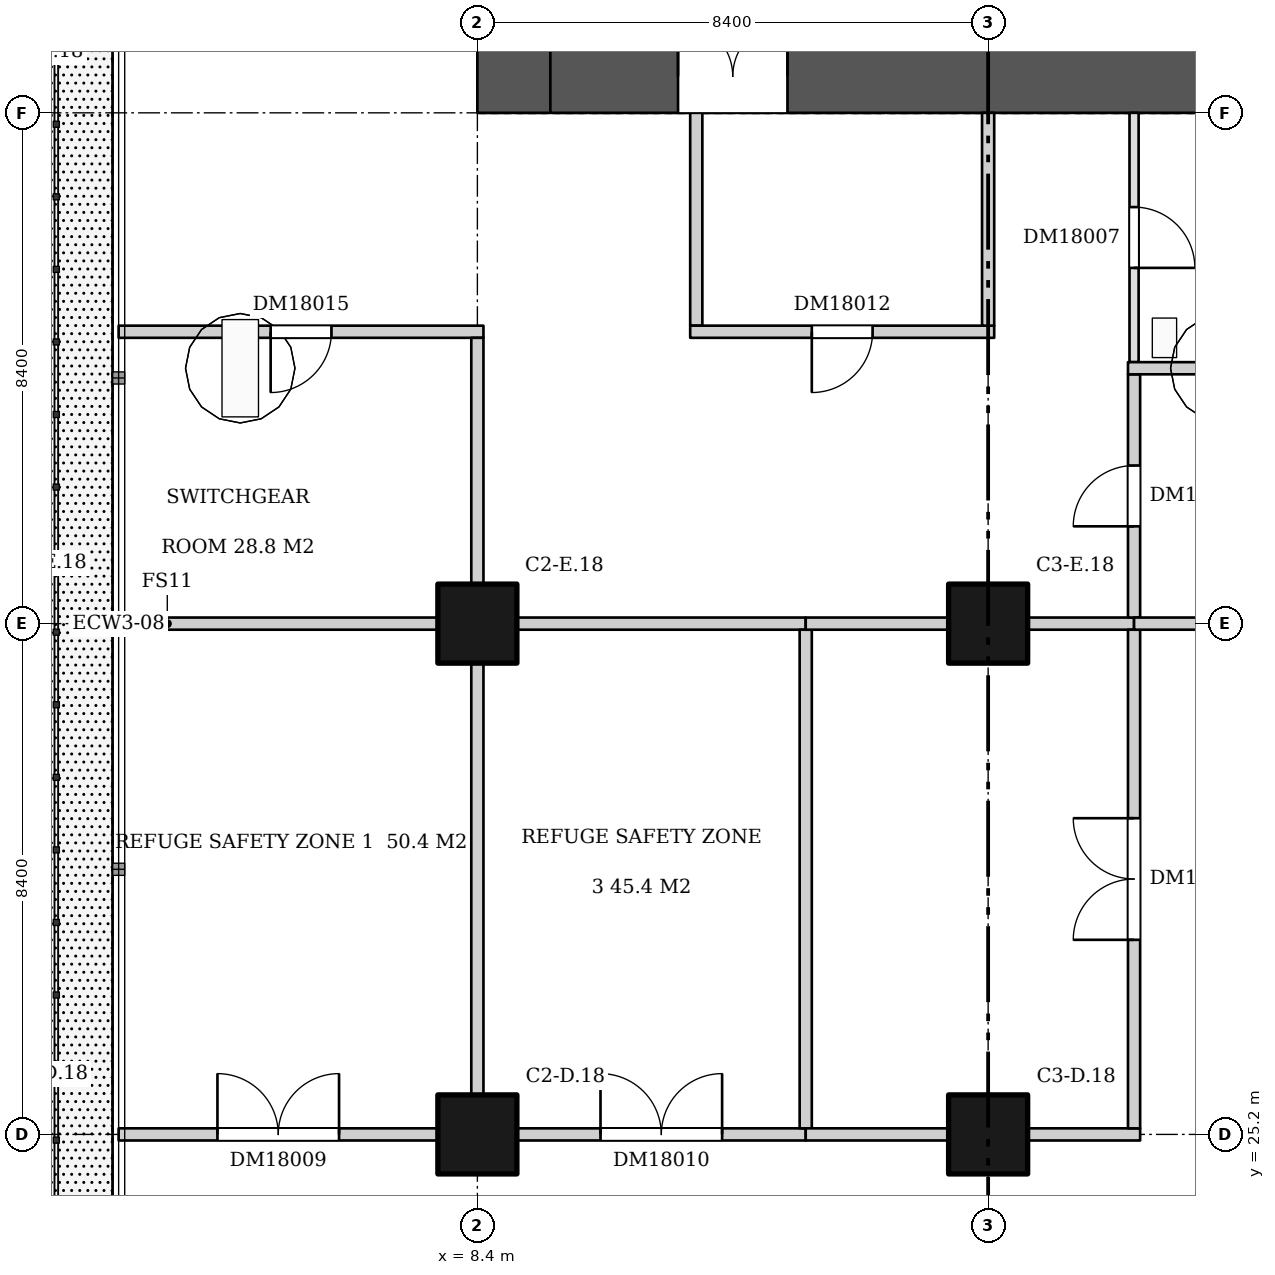
"""IFC4 building model, lengths in metres.
Left out: names, types, materials, properties, quantities, classifications, styles, units other than length and angle.
Written with IfcOpenShell. Run it as: python <this file> out.ifc"""

import sys

from ifc_helpers import new_model, si_unit, direction, frame, frame_2d, origin, origin_2d, place, context, subcontext, project, spatial, rectangle, extrude, element, fill, save


model = new_model("IFC4")
c1 = context("Model", 3, precision=1e-05, world=origin(), true_north=direction((0.0, 1.0)))
c2 = subcontext(c1, "Body", "Model", "MODEL_VIEW")
j1 = project(units=[si_unit("LENGTHUNIT", "METRE"), si_unit("PLANEANGLEUNIT", "RADIAN")], contexts=[c1])
p1 = place(None, origin())
s1 = spatial("IfcSite", under=j1, at=p1, CompositionType="ELEMENT")
p2 = place(p1, origin())
s2 = spatial("IfcBuilding", under=s1, at=p2, CompositionType="ELEMENT")
p3 = place(p2, frame((0.0, 0.0, 74.2)))
s3 = spatial("IfcBuildingStorey", under=s2, at=p3, CompositionType="ELEMENT", Elevation=74.2)
for number, where, z_axis, x_axis in (
    (1, (8.4, 25.2, 0.0), (0.0, 0.0, 1.0), (1.0, 0.0, 0.0)),
    (2, (8.4, 33.6, 0.0), (0.0, 0.0, 1.0), (1.0, 0.0, 0.0)),
    (3, (16.8, 25.2, 0.0), (0.0, 0.0, 1.0), (1.0, 0.0, 0.0)),
    (4, (16.8, 33.6, 0.0), (0.0, 0.0, 1.0), (1.0, 0.0, 0.0)),
):
    element("IfcColumn", number, at=place(p3, frame(where, z_axis=z_axis, x_axis=x_axis)), inside=s3, PredefinedType="COLUMN", context=c2, shape_type="SweptSolid", body=[
        extrude(rectangle(XDim=1.3, YDim=1.3, at=origin_2d()), origin(), (0.0, 0.0, 1.0), 6.72),
    ])
p4 = place(p3, frame((9.0, 58.8, 0.0), z_axis=(0.0, 0.0, 1.0), x_axis=(0.0, -1.0, 0.0)))
e5 = element("IfcWall", 5, at=p4, inside=s3, PredefinedType="SHEAR", context=c2, shape_type="SweptSolid", body=[
    extrude(rectangle(XDim=16.8, YDim=1.2, at=frame_2d((8.4, 0.0))), origin(), (0.0, 0.0, 1.0), 6.72),
])
p5 = place(p4, frame((3.1, 0.0, 0.0)))
e6 = element("IfcOpeningElement", 6, at=p5, cuts=e5, PredefinedType="OPENING", context=c2, shape_type="SweptSolid", body=[
    extrude(rectangle(XDim=1.0, YDim=2.1, at=frame_2d((0.5, 1.05))), frame((0.0, 0.61, 0.0), z_axis=(0.0, -1.0, 0.0), x_axis=(1.0, 0.0, 0.0)), (0.0, 0.0, 1.0), 1.22),
])
p6 = place(p4, frame((12.7, 0.0, 0.0)))
e7 = element("IfcOpeningElement", 7, at=p6, cuts=e5, PredefinedType="OPENING", context=c2, shape_type="SweptSolid", body=[
    extrude(rectangle(XDim=1.0, YDim=2.1, at=frame_2d((0.5, 1.05))), frame((0.0, 0.61, 0.0), z_axis=(0.0, -1.0, 0.0), x_axis=(1.0, 0.0, 0.0)), (0.0, 0.0, 1.0), 1.22),
])
p7 = place(p3, frame((9.6, 42.6, 0.0), z_axis=(0.0, 0.0, 1.0), x_axis=(1.0, 0.0, 0.0)))
e8 = element("IfcWall", 8, at=p7, inside=s3, PredefinedType="SHEAR", context=c2, shape_type="SweptSolid", body=[
    extrude(rectangle(XDim=14.4, YDim=1.2, at=frame_2d((7.2, 0.0))), origin(), (0.0, 0.0, 1.0), 6.72),
])
p8 = place(p7, frame((2.1, 0.0, 0.0)))
e9 = element("IfcOpeningElement", 9, at=p8, cuts=e8, PredefinedType="OPENING", context=c2, shape_type="SweptSolid", body=[
    extrude(rectangle(XDim=1.8, YDim=2.1, at=frame_2d((0.9, 1.05))), frame((0.0, 0.61, 0.0), z_axis=(0.0, -1.0, 0.0), x_axis=(1.0, 0.0, 0.0)), (0.0, 0.0, 1.0), 1.22),
])
p9 = place(p3, frame((2.5, 25.2, 0.0), z_axis=(0.0, 0.0, 1.0), x_axis=(1.0, 0.0, 0.0)))
e10 = element("IfcWall", 10, at=p9, inside=s3, PredefinedType="PARTITIONING", context=c2, shape_type="SweptSolid", body=[
    extrude(rectangle(XDim=5.25, YDim=0.2, at=frame_2d((2.625, 0.0))), origin(), (0.0, 0.0, 1.0), 6.72),
])
p10 = place(p9, frame((1.625, 0.0, 0.0)))
e11 = element("IfcOpeningElement", 11, at=p10, cuts=e10, PredefinedType="OPENING", context=c2, shape_type="SweptSolid", body=[
    extrude(rectangle(XDim=2.0, YDim=2.1, at=frame_2d((1.0, 1.05))), frame((0.0, 0.11, 0.0), z_axis=(0.0, -1.0, 0.0), x_axis=(1.0, 0.0, 0.0)), (0.0, 0.0, 1.0), 0.22),
])
p11 = place(p3, frame((2.5, 33.6, 0.0), z_axis=(0.0, 0.0, 1.0), x_axis=(1.0, 0.0, 0.0)))
e12 = element("IfcWall", 12, at=p11, inside=s3, PredefinedType="PARTITIONING", context=c2, shape_type="SweptSolid", body=[
    extrude(rectangle(XDim=5.25, YDim=0.2, at=frame_2d((2.625, 0.0))), origin(), (0.0, 0.0, 1.0), 6.72),
])
p12 = place(p3, frame((2.5, 38.4, 0.0), z_axis=(0.0, 0.0, 1.0), x_axis=(1.0, 0.0, 0.0)))
e13 = element("IfcWall", 13, at=p12, inside=s3, PredefinedType="PARTITIONING", context=c2, shape_type="SweptSolid", body=[
    extrude(rectangle(XDim=6.0, YDim=0.2, at=frame_2d((3.0, 0.0))), origin(), (0.0, 0.0, 1.0), 6.72),
])
p13 = place(p12, frame((2.5, 0.0, 0.0)))
e14 = element("IfcOpeningElement", 14, at=p13, cuts=e13, PredefinedType="OPENING", context=c2, shape_type="SweptSolid", body=[
    extrude(rectangle(XDim=1.0, YDim=2.1, at=frame_2d((0.5, 1.05))), frame((0.0, 0.11, 0.0), z_axis=(0.0, -1.0, 0.0), x_axis=(1.0, 0.0, 0.0)), (0.0, 0.0, 1.0), 0.22),
])
p14 = place(p3, frame((8.4, 25.85, 0.0), z_axis=(0.0, 0.0, 1.0), x_axis=(0.0, 1.0, 0.0)))
e15 = element("IfcWall", 15, at=p14, inside=s3, PredefinedType="PARTITIONING", context=c2, shape_type="SweptSolid", body=[
    extrude(rectangle(XDim=7.1, YDim=0.2, at=frame_2d((3.55, 0.0))), origin(), (0.0, 0.0, 1.0), 6.72),
])
p15 = place(p3, frame((9.05, 25.2, 0.0), z_axis=(0.0, 0.0, 1.0), x_axis=(1.0, 0.0, 0.0)))
e16 = element("IfcWall", 16, at=p15, inside=s3, PredefinedType="PARTITIONING", context=c2, shape_type="SweptSolid", body=[
    extrude(rectangle(XDim=4.75, YDim=0.2, at=frame_2d((2.375, 0.0))), origin(), (0.0, 0.0, 1.0), 6.72),
])
p16 = place(p15, frame((1.375, 0.0, 0.0)))
e17 = element("IfcOpeningElement", 17, at=p16, cuts=e16, PredefinedType="OPENING", context=c2, shape_type="SweptSolid", body=[
    extrude(rectangle(XDim=2.0, YDim=2.1, at=frame_2d((1.0, 1.05))), frame((0.0, 0.11, 0.0), z_axis=(0.0, -1.0, 0.0), x_axis=(1.0, 0.0, 0.0)), (0.0, 0.0, 1.0), 0.22),
])
p17 = place(p3, frame((8.4, 34.25, 0.0), z_axis=(0.0, 0.0, 1.0), x_axis=(0.0, 1.0, 0.0)))
e18 = element("IfcWall", 18, at=p17, inside=s3, PredefinedType="PARTITIONING", context=c2, shape_type="SweptSolid", body=[
    extrude(rectangle(XDim=4.05, YDim=0.2, at=frame_2d((2.025, 0.0))), origin(), (0.0, 0.0, 1.0), 6.72),
])
p18 = place(p3, frame((9.05, 33.6, 0.0), z_axis=(0.0, 0.0, 1.0), x_axis=(1.0, 0.0, 0.0)))
e19 = element("IfcWall", 19, at=p18, inside=s3, PredefinedType="PARTITIONING", context=c2, shape_type="SweptSolid", body=[
    extrude(rectangle(XDim=4.75, YDim=0.2, at=frame_2d((2.375, 0.0))), origin(), (0.0, 0.0, 1.0), 6.72),
])
p19 = place(p3, frame((12.0, 38.5, 0.0), z_axis=(0.0, 0.0, 1.0), x_axis=(0.0, 1.0, 0.0)))
e20 = element("IfcWall", 20, at=p19, inside=s3, PredefinedType="PARTITIONING", context=c2, shape_type="SweptSolid", body=[
    extrude(rectangle(XDim=3.5, YDim=0.2, at=frame_2d((1.75, 0.0))), origin(), (0.0, 0.0, 1.0), 6.72),
])
p20 = place(p3, frame((11.9, 38.4, 0.0), z_axis=(0.0, 0.0, 1.0), x_axis=(1.0, 0.0, 0.0)))
e21 = element("IfcWall", 21, at=p20, inside=s3, PredefinedType="PARTITIONING", context=c2, shape_type="SweptSolid", body=[
    extrude(rectangle(XDim=5.0, YDim=0.2, at=frame_2d((2.5, 0.0))), origin(), (0.0, 0.0, 1.0), 6.72),
])
p21 = place(p20, frame((2.0, 0.0, 0.0)))
e22 = element("IfcOpeningElement", 22, at=p21, cuts=e21, PredefinedType="OPENING", context=c2, shape_type="SweptSolid", body=[
    extrude(rectangle(XDim=1.0, YDim=2.1, at=frame_2d((0.5, 1.05))), frame((0.0, 0.11, 0.0), z_axis=(0.0, -1.0, 0.0), x_axis=(1.0, 0.0, 0.0)), (0.0, 0.0, 1.0), 0.22),
])
p22 = place(p3, frame((13.8, 25.3, 0.0), z_axis=(0.0, 0.0, 1.0), x_axis=(0.0, 1.0, 0.0)))
e23 = element("IfcWall", 23, at=p22, inside=s3, PredefinedType="PARTITIONING", context=c2, shape_type="SweptSolid", body=[
    extrude(rectangle(XDim=8.2, YDim=0.2, at=frame_2d((4.1, 0.0))), origin(), (0.0, 0.0, 1.0), 6.72),
])
p23 = place(p3, frame((13.8, 25.2, 0.0), z_axis=(0.0, 0.0, 1.0), x_axis=(1.0, 0.0, 0.0)))
e24 = element("IfcWall", 24, at=p23, inside=s3, PredefinedType="PARTITIONING", context=c2, shape_type="SweptSolid", body=[
    extrude(rectangle(XDim=2.35, YDim=0.2, at=frame_2d((1.175, 0.0))), origin(), (0.0, 0.0, 1.0), 6.72),
])
p24 = place(p3, frame((17.45, 25.2, 0.0), z_axis=(0.0, 0.0, 1.0), x_axis=(1.0, 0.0, 0.0)))
e25 = element("IfcWall", 25, at=p24, inside=s3, PredefinedType="PARTITIONING", context=c2, shape_type="SweptSolid", body=[
    extrude(rectangle(XDim=1.85, YDim=0.2, at=frame_2d((0.925, 0.0))), origin(), (0.0, 0.0, 1.0), 6.72),
])
p25 = place(p3, frame((13.8, 33.6, 0.0), z_axis=(0.0, 0.0, 1.0), x_axis=(1.0, 0.0, 0.0)))
e26 = element("IfcWall", 26, at=p25, inside=s3, PredefinedType="PARTITIONING", context=c2, shape_type="SweptSolid", body=[
    extrude(rectangle(XDim=2.35, YDim=0.2, at=frame_2d((1.175, 0.0))), origin(), (0.0, 0.0, 1.0), 6.72),
])
p26 = place(p3, frame((17.45, 33.6, 0.0), z_axis=(0.0, 0.0, 1.0), x_axis=(1.0, 0.0, 0.0)))
e27 = element("IfcWall", 27, at=p26, inside=s3, PredefinedType="PARTITIONING", context=c2, shape_type="SweptSolid", body=[
    extrude(rectangle(XDim=1.75, YDim=0.2, at=frame_2d((0.875, 0.0))), origin(), (0.0, 0.0, 1.0), 6.72),
])
p27 = place(p3, frame((16.8, 38.5, 0.0), z_axis=(0.0, 0.0, 1.0), x_axis=(0.0, 1.0, 0.0)))
e28 = element("IfcWall", 28, at=p27, inside=s3, PredefinedType="PARTITIONING", context=c2, shape_type="SweptSolid", body=[
    extrude(rectangle(XDim=3.5, YDim=0.2, at=frame_2d((1.75, 0.0))), origin(), (0.0, 0.0, 1.0), 6.72),
])
p28 = place(p3, frame((19.2, 25.3, 0.0), z_axis=(0.0, 0.0, 1.0), x_axis=(0.0, 1.0, 0.0)))
e29 = element("IfcWall", 29, at=p28, inside=s3, PredefinedType="PARTITIONING", context=c2, shape_type="SweptSolid", body=[
    extrude(rectangle(XDim=8.2, YDim=0.2, at=frame_2d((4.1, 0.0))), origin(), (0.0, 0.0, 1.0), 6.72),
])
p29 = place(p28, frame((3.1, 0.0, 0.0)))
e30 = element("IfcOpeningElement", 30, at=p29, cuts=e29, PredefinedType="OPENING", context=c2, shape_type="SweptSolid", body=[
    extrude(rectangle(XDim=2.0, YDim=2.1, at=frame_2d((1.0, 1.05))), frame((0.0, 0.11, 0.0), z_axis=(0.0, -1.0, 0.0), x_axis=(1.0, 0.0, 0.0)), (0.0, 0.0, 1.0), 0.22),
])
p30 = place(p3, frame((19.2, 33.7, 0.0), z_axis=(0.0, 0.0, 1.0), x_axis=(0.0, 1.0, 0.0)))
e31 = element("IfcWall", 31, at=p30, inside=s3, PredefinedType="PARTITIONING", context=c2, shape_type="SweptSolid", body=[
    extrude(rectangle(XDim=4.0, YDim=0.2, at=frame_2d((2.0, 0.0))), origin(), (0.0, 0.0, 1.0), 6.72),
])
p31 = place(p30, frame((1.5, 0.0, 0.0)))
e32 = element("IfcOpeningElement", 32, at=p31, cuts=e31, PredefinedType="OPENING", context=c2, shape_type="SweptSolid", body=[
    extrude(rectangle(XDim=1.0, YDim=2.1, at=frame_2d((0.5, 1.05))), frame((0.0, 0.11, 0.0), z_axis=(0.0, -1.0, 0.0), x_axis=(1.0, 0.0, 0.0)), (0.0, 0.0, 1.0), 0.22),
])
p32 = place(p3, frame((19.2, 33.6, 0.0), z_axis=(0.0, 0.0, 1.0), x_axis=(1.0, 0.0, 0.0)))
e33 = element("IfcWall", 33, at=p32, inside=s3, PredefinedType="PARTITIONING", context=c2, shape_type="SweptSolid", body=[
    extrude(rectangle(XDim=3.5, YDim=0.2, at=frame_2d((1.75, 0.0))), origin(), (0.0, 0.0, 1.0), 6.72),
])
p33 = place(p3, frame((19.2, 37.9, 0.0), z_axis=(0.0, 0.0, 1.0), x_axis=(0.0, 1.0, 0.0)))
e34 = element("IfcWall", 34, at=p33, inside=s3, PredefinedType="PARTITIONING", context=c2, shape_type="SweptSolid", body=[
    extrude(rectangle(XDim=4.1, YDim=0.15, at=frame_2d((2.05, 0.0))), origin(), (0.0, 0.0, 1.0), 6.72),
])
p34 = place(p33, frame((1.55, 0.0, 0.0)))
e35 = element("IfcOpeningElement", 35, at=p34, cuts=e34, PredefinedType="OPENING", context=c2, shape_type="SweptSolid", body=[
    extrude(rectangle(XDim=1.0, YDim=2.1, at=frame_2d((0.5, 1.05))), frame((0.0, 0.085, 0.0), z_axis=(0.0, -1.0, 0.0), x_axis=(1.0, 0.0, 0.0)), (0.0, 0.0, 1.0), 0.17),
])
p35 = place(p3, frame((19.1, 37.8, 0.0), z_axis=(0.0, 0.0, 1.0), x_axis=(1.0, 0.0, 0.0)))
e36 = element("IfcWall", 36, at=p35, inside=s3, PredefinedType="PARTITIONING", context=c2, shape_type="SweptSolid", body=[
    extrude(rectangle(XDim=3.6, YDim=0.2, at=frame_2d((1.8, 0.0))), origin(), (0.0, 0.0, 1.0), 6.72),
])
p36 = place(p8, origin())
e37 = element("IfcDoor", 37, at=p36, inside=s3, OperationType="DOUBLE_DOOR_SINGLE_SWING", PredefinedType="DOOR", context=c2, shape_type="SweptSolid", body=[
    extrude(rectangle(XDim=1.8, YDim=2.1, at=frame_2d((0.9, 1.05))), frame((0.0, 0.025, 0.0), z_axis=(0.0, -1.0, 0.0), x_axis=(1.0, 0.0, 0.0)), (0.0, 0.0, 1.0), 0.05),
])
fill(e9, e37)
p37 = place(p34, frame((1.0, 0.0, 0.0), z_axis=(0.0, 0.0, 1.0), x_axis=(-1.0, 0.0, 0.0)))
e38 = element("IfcDoor", 38, at=p37, inside=s3, OperationType="SINGLE_SWING_RIGHT", PredefinedType="DOOR", context=c2, shape_type="SweptSolid", body=[
    extrude(rectangle(XDim=1.0, YDim=2.1, at=frame_2d((0.5, 1.05))), frame((0.0, 0.025, 0.0), z_axis=(0.0, -1.0, 0.0), x_axis=(1.0, 0.0, 0.0)), (0.0, 0.0, 1.0), 0.05),
])
fill(e35, e38)
p38 = place(p31, origin())
e39 = element("IfcDoor", 39, at=p38, inside=s3, OperationType="SINGLE_SWING_LEFT", PredefinedType="DOOR", context=c2, shape_type="SweptSolid", body=[
    extrude(rectangle(XDim=1.0, YDim=2.1, at=frame_2d((0.5, 1.05))), frame((0.0, 0.025, 0.0), z_axis=(0.0, -1.0, 0.0), x_axis=(1.0, 0.0, 0.0)), (0.0, 0.0, 1.0), 0.05),
])
fill(e32, e39)
p39 = place(p10, origin())
e40 = element("IfcDoor", 40, at=p39, inside=s3, OperationType="DOUBLE_DOOR_SINGLE_SWING", PredefinedType="DOOR", context=c2, shape_type="SweptSolid", body=[
    extrude(rectangle(XDim=2.0, YDim=2.1, at=frame_2d((1.0, 1.05))), frame((0.0, 0.025, 0.0), z_axis=(0.0, -1.0, 0.0), x_axis=(1.0, 0.0, 0.0)), (0.0, 0.0, 1.0), 0.05),
])
fill(e11, e40)
p40 = place(p16, origin())
e41 = element("IfcDoor", 41, at=p40, inside=s3, OperationType="DOUBLE_DOOR_SINGLE_SWING", PredefinedType="DOOR", context=c2, shape_type="SweptSolid", body=[
    extrude(rectangle(XDim=2.0, YDim=2.1, at=frame_2d((1.0, 1.05))), frame((0.0, 0.025, 0.0), z_axis=(0.0, -1.0, 0.0), x_axis=(1.0, 0.0, 0.0)), (0.0, 0.0, 1.0), 0.05),
])
fill(e17, e41)
p41 = place(p29, origin())
e42 = element("IfcDoor", 42, at=p41, inside=s3, OperationType="DOUBLE_DOOR_SINGLE_SWING", PredefinedType="DOOR", context=c2, shape_type="SweptSolid", body=[
    extrude(rectangle(XDim=2.0, YDim=2.1, at=frame_2d((1.0, 1.05))), frame((0.0, 0.025, 0.0), z_axis=(0.0, -1.0, 0.0), x_axis=(1.0, 0.0, 0.0)), (0.0, 0.0, 1.0), 0.05),
])
fill(e30, e42)
p42 = place(p21, frame((1.0, 0.0, 0.0), z_axis=(0.0, 0.0, 1.0), x_axis=(-1.0, 0.0, 0.0)))
e43 = element("IfcDoor", 43, at=p42, inside=s3, OperationType="SINGLE_SWING_RIGHT", PredefinedType="DOOR", context=c2, shape_type="SweptSolid", body=[
    extrude(rectangle(XDim=1.0, YDim=2.1, at=frame_2d((0.5, 1.05))), frame((0.0, 0.025, 0.0), z_axis=(0.0, -1.0, 0.0), x_axis=(1.0, 0.0, 0.0)), (0.0, 0.0, 1.0), 0.05),
])
fill(e22, e43)
p43 = place(p13, frame((1.0, 0.0, 0.0), z_axis=(0.0, 0.0, 1.0), x_axis=(-1.0, 0.0, 0.0)))
e44 = element("IfcDoor", 44, at=p43, inside=s3, OperationType="SINGLE_SWING_RIGHT", PredefinedType="DOOR", context=c2, shape_type="SweptSolid", body=[
    extrude(rectangle(XDim=1.0, YDim=2.1, at=frame_2d((0.5, 1.05))), frame((0.0, 0.025, 0.0), z_axis=(0.0, -1.0, 0.0), x_axis=(1.0, 0.0, 0.0)), (0.0, 0.0, 1.0), 0.05),
])
fill(e14, e44)
save(model, sys.argv[1])
